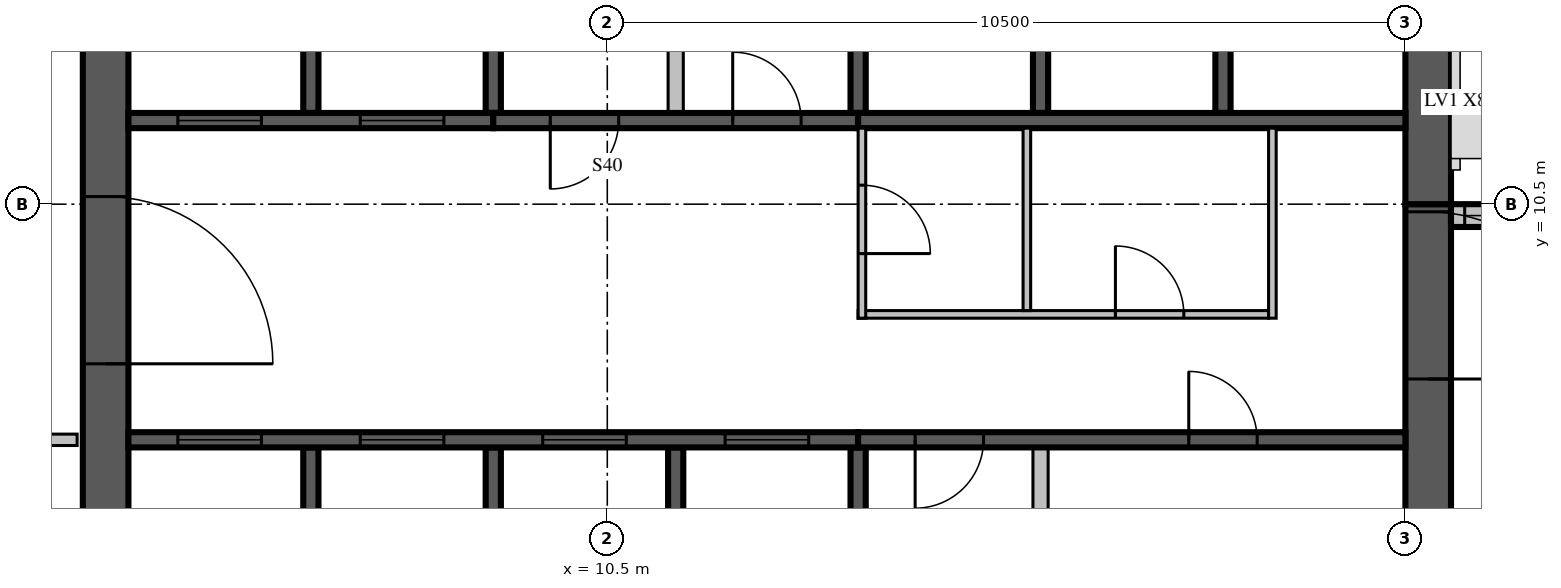
"""IFC4 building model, lengths in metres.
Left out: names, types, materials, properties, quantities, classifications, styles, units other than length and angle.
Written with IfcOpenShell. Run it as: python <this file> out.ifc"""

import sys

from ifc_helpers import new_model, si_unit, direction, frame, frame_2d, origin, place, context, subcontext, project, spatial, rectangle, extrude, source, transform, mapped, element, fill, save


model = new_model("IFC4")
c1 = context("Model", 3, precision=1e-05, world=origin(), true_north=direction((0.0, 1.0)))
c2 = subcontext(c1, "Body", "Model", "MODEL_VIEW")
j1 = project(units=[si_unit("LENGTHUNIT", "METRE"), si_unit("PLANEANGLEUNIT", "RADIAN")], contexts=[c1])
p1 = place(None, origin())
s1 = spatial("IfcSite", under=j1, at=p1, CompositionType="ELEMENT")
p2 = place(p1, origin())
s2 = spatial("IfcBuilding", under=s1, at=p2, CompositionType="ELEMENT")
p3 = place(p2, frame((0.0, 0.0, 312.5)))
s3 = spatial("IfcBuildingStorey", under=s2, at=p3, CompositionType="ELEMENT", Elevation=312.5)
m1 = source(origin(), c2, "Body", "SweptSolid", [
    extrude(rectangle(XDim=17.4, YDim=0.6, at=frame_2d((8.7, 0.0))), origin(), (0.0, 0.0, 1.0), 3.5),
])
p4 = place(p3, frame((3.9, 4.2, 0.0), z_axis=(0.0, 0.0, 1.0), x_axis=(0.0, 1.0, 0.0)))
e1 = element("IfcWall", 1, at=p4, inside=s3, PredefinedType="SHEAR", context=c2, shape_type="MappedRepresentation", body=[
    mapped(m1, transform((0.0, 0.0, 0.0), scale=1.0)),
])
m2 = source(origin(), c2, "Body", "SweptSolid", [
    extrude(rectangle(XDim=2.2, YDim=2.1, at=frame_2d((1.1, 1.05))), frame((0.0, 0.31, 0.0), z_axis=(0.0, -1.0, 0.0), x_axis=(1.0, 0.0, 0.0)), (0.0, 0.0, 1.0), 0.62),
])
p5 = place(p4, frame((4.2, 0.0, 0.0)))
e2 = element("IfcOpeningElement", 2, at=p5, cuts=e1, PredefinedType="OPENING", context=c2, shape_type="MappedRepresentation", body=[
    mapped(m2, transform((0.0, 0.0, 0.0), scale=1.0)),
])
m3 = source(origin(), c2, "Body", "SweptSolid", [
    extrude(rectangle(XDim=6.3, YDim=0.6, at=frame_2d((3.15, 0.0))), origin(), (0.0, 0.0, 1.0), 3.5),
])
p6 = place(p3, frame((21.3, 4.2, 0.0), z_axis=(0.0, 0.0, 1.0), x_axis=(0.0, 1.0, 0.0)))
e3 = element("IfcWall", 3, at=p6, inside=s3, PredefinedType="SHEAR", context=c2, shape_type="MappedRepresentation", body=[
    mapped(m3, transform((0.0, 0.0, 0.0), scale=1.0)),
])
p7 = place(p6, frame((4.0, 0.0, 0.0)))
e4 = element("IfcOpeningElement", 4, at=p7, cuts=e3, PredefinedType="OPENING", context=c2, shape_type="MappedRepresentation", body=[
    mapped(m2, transform((0.0, 0.0, 0.0), scale=1.0)),
])
m4 = source(origin(), c2, "Body", "SweptSolid", [
    extrude(rectangle(XDim=10.5, YDim=0.6, at=frame_2d((5.25, 0.0))), origin(), (0.0, 0.0, 1.0), 3.5),
])
p8 = place(p3, frame((21.3, 10.5, 0.0), z_axis=(0.0, 0.0, 1.0), x_axis=(0.0, 1.0, 0.0)))
e5 = element("IfcWall", 5, at=p8, inside=s3, PredefinedType="SHEAR", context=c2, shape_type="MappedRepresentation", body=[
    mapped(m4, transform((0.0, 0.0, 0.0), scale=1.0)),
])
m5 = source(origin(), c2, "Body", "SweptSolid", [
    extrude(rectangle(XDim=1.2, YDim=2.4, at=frame_2d((0.6, 1.2))), frame((0.0, 0.31, 0.0), z_axis=(0.0, -1.0, 0.0), x_axis=(1.0, 0.0, 0.0)), (0.0, 0.0, 1.0), 0.62),
])
p9 = place(p8, frame((5.7, 0.0, 0.6)))
e6 = element("IfcOpeningElement", 6, at=p9, cuts=e5, PredefinedType="OPENING", context=c2, shape_type="MappedRepresentation", body=[
    mapped(m5, transform((0.0, 0.0, 0.0), scale=1.0)),
])
m6 = source(origin(), c2, "Body", "SweptSolid", [
    extrude(rectangle(XDim=7.45, YDim=0.3, at=frame_2d((3.725, 0.0))), origin(), (0.0, 0.0, 1.0), 3.1),
])
p10 = place(p3, frame((29.05, 10.35, 0.0), z_axis=(0.0, 0.0, 1.0), x_axis=(-1.0, 0.0, 0.0)))
e7 = element("IfcWall", 7, at=p10, inside=s3, PredefinedType="STANDARD", context=c2, shape_type="MappedRepresentation", body=[
    mapped(m6, transform((0.0, 0.0, 0.0), scale=1.0)),
])
m7 = source(origin(), c2, "Body", "SweptSolid", [
    extrude(rectangle(XDim=3.0, YDim=2.0, at=frame_2d((1.5, 1.0))), frame((0.0, 0.16, 0.0), z_axis=(0.0, -1.0, 0.0), x_axis=(1.0, 0.0, 0.0)), (0.0, 0.0, 1.0), 0.32),
])
p11 = place(p10, frame((1.09, 0.0, 0.6)))
e8 = element("IfcOpeningElement", 8, at=p11, cuts=e7, PredefinedType="OPENING", context=c2, shape_type="MappedRepresentation", body=[
    mapped(m7, transform((0.0, 0.0, 0.0), scale=1.0)),
])
m8 = source(origin(), c2, "Body", "SweptSolid", [
    extrude(rectangle(XDim=1.8, YDim=2.0, at=frame_2d((0.9, 1.0))), frame((0.0, 0.16, 0.0), z_axis=(0.0, -1.0, 0.0), x_axis=(1.0, 0.0, 0.0)), (0.0, 0.0, 1.0), 0.32),
])
p12 = place(p10, frame((5.47, 0.0, 0.6)))
e9 = element("IfcOpeningElement", 9, at=p12, cuts=e7, PredefinedType="OPENING", context=c2, shape_type="MappedRepresentation", body=[
    mapped(m8, transform((0.0, 0.0, 0.0), scale=1.0)),
])
m9 = source(origin(), c2, "Body", "SweptSolid", [
    extrude(rectangle(XDim=3.1, YDim=0.2, at=frame_2d((1.55, 0.0))), origin(), (0.0, 0.0, 1.0), 3.5),
])
for number, where, z_axis, x_axis in (
    (10, (6.6, 4.2, 0.0), (0.0, 0.0, 1.0), (0.0, 1.0, 0.0)),
    (11, (9.0, 4.2, 0.0), (0.0, 0.0, 1.0), (0.0, 1.0, 0.0)),
    (12, (11.4, 4.2, 0.0), (0.0, 0.0, 1.0), (0.0, 1.0, 0.0)),
):
    element("IfcWall", number, at=place(p3, frame(where, z_axis=z_axis, x_axis=x_axis)), inside=s3, PredefinedType="SOLIDWALL", context=c2, shape_type="MappedRepresentation", body=[
        mapped(m9, transform((0.0, 0.0, 0.0), scale=1.0)),
    ])
m10 = source(origin(), c2, "Body", "SweptSolid", [
    extrude(rectangle(XDim=3.1, YDim=0.2, at=frame_2d((1.55, 0.0))), origin(), (0.0, 0.0, 1.0), 3.1),
])
p13 = place(p3, frame((13.8, 4.2, 0.0), z_axis=(0.0, 0.0, 1.0), x_axis=(0.0, 1.0, 0.0)))
e13 = element("IfcWall", 13, at=p13, inside=s3, PredefinedType="SOLIDWALL", context=c2, shape_type="MappedRepresentation", body=[
    mapped(m10, transform((0.0, 0.0, 0.0), scale=1.0)),
])
m11 = source(origin(), c2, "Body", "SweptSolid", [
    extrude(rectangle(XDim=3.1, YDim=0.2, at=frame_2d((1.55, 0.0))), origin(), (0.0, 0.0, 1.0), 3.1),
])
p14 = place(p3, frame((16.2, 4.2, 0.0), z_axis=(0.0, 0.0, 1.0), x_axis=(0.0, 1.0, 0.0)))
e14 = element("IfcWall", 14, at=p14, inside=s3, PredefinedType="PARTITIONING", context=c2, shape_type="MappedRepresentation", body=[
    mapped(m11, transform((0.0, 0.0, 0.0), scale=1.0)),
])
m12 = source(origin(), c2, "Body", "SweptSolid", [
    extrude(rectangle(XDim=3.0, YDim=0.2, at=frame_2d((1.5, 0.0))), origin(), (0.0, 0.0, 1.0), 3.5),
])
p15 = place(p3, frame((6.6, 11.7, 0.0), z_axis=(0.0, 0.0, 1.0), x_axis=(0.0, 1.0, 0.0)))
e15 = element("IfcWall", 15, at=p15, inside=s3, PredefinedType="SOLIDWALL", context=c2, shape_type="MappedRepresentation", body=[
    mapped(m12, transform((0.0, 0.0, 0.0), scale=1.0)),
])
m13 = source(origin(), c2, "Body", "SweptSolid", [
    extrude(rectangle(XDim=3.0, YDim=0.2, at=frame_2d((1.5, 0.0))), origin(), (0.0, 0.0, 1.0), 3.1),
])
for number, where, z_axis, x_axis in (
    (16, (9.0, 11.7, 0.0), (0.0, 0.0, 1.0), (0.0, 1.0, 0.0)),
    (17, (13.8, 11.7, 0.0), (0.0, 0.0, 1.0), (0.0, 1.0, 0.0)),
):
    element("IfcWall", number, at=place(p3, frame(where, z_axis=z_axis, x_axis=x_axis)), inside=s3, PredefinedType="SOLIDWALL", context=c2, shape_type="MappedRepresentation", body=[
        mapped(m13, transform((0.0, 0.0, 0.0), scale=1.0)),
    ])
for number, where, z_axis, x_axis in (
    (18, (16.2, 11.7, 0.0), (0.0, 0.0, 1.0), (0.0, 1.0, 0.0)),
    (19, (18.6, 11.7, 0.0), (0.0, 0.0, 1.0), (0.0, 1.0, 0.0)),
):
    element("IfcWall", number, at=place(p3, frame(where, z_axis=z_axis, x_axis=x_axis)), inside=s3, PredefinedType="SOLIDWALL", context=c2, shape_type="MappedRepresentation", body=[
        mapped(m12, transform((0.0, 0.0, 0.0), scale=1.0)),
    ])
m14 = source(origin(), c2, "Body", "SweptSolid", [
    extrude(rectangle(XDim=3.0, YDim=0.2, at=frame_2d((1.5, 0.0))), origin(), (0.0, 0.0, 1.0), 3.1),
])
p16 = place(p3, frame((11.4, 11.7, 0.0), z_axis=(0.0, 0.0, 1.0), x_axis=(0.0, 1.0, 0.0)))
e20 = element("IfcWall", 20, at=p16, inside=s3, PredefinedType="PARTITIONING", context=c2, shape_type="MappedRepresentation", body=[
    mapped(m14, transform((0.0, 0.0, 0.0), scale=1.0)),
])
m15 = source(origin(), c2, "Body", "SweptSolid", [
    extrude(rectangle(XDim=9.6, YDim=0.2, at=frame_2d((4.8, 0.0))), origin(), (0.0, 0.0, 1.0), 3.5),
])
p17 = place(p3, frame((4.2, 7.4, 0.0), z_axis=(0.0, 0.0, 1.0), x_axis=(1.0, 0.0, 0.0)))
e21 = element("IfcWall", 21, at=p17, inside=s3, PredefinedType="SOLIDWALL", context=c2, shape_type="MappedRepresentation", body=[
    mapped(m15, transform((0.0, 0.0, 0.0), scale=1.0)),
])
m16 = source(origin(), c2, "Body", "SweptSolid", [
    extrude(rectangle(XDim=1.1, YDim=2.1, at=frame_2d((0.55, 1.05))), frame((0.0, 0.11, 0.0), z_axis=(0.0, -1.0, 0.0), x_axis=(1.0, 0.0, 0.0)), (0.0, 0.0, 1.0), 0.22),
])
p18 = place(p17, frame((0.65, 0.0, 0.0)))
e22 = element("IfcOpeningElement", 22, at=p18, cuts=e21, PredefinedType="OPENING", context=c2, shape_type="MappedRepresentation", body=[
    mapped(m16, transform((0.0, 0.0, 0.0), scale=1.0)),
])
p19 = place(p17, frame((3.05, 0.0, 0.0)))
e23 = element("IfcOpeningElement", 23, at=p19, cuts=e21, PredefinedType="OPENING", context=c2, shape_type="MappedRepresentation", body=[
    mapped(m16, transform((0.0, 0.0, 0.0), scale=1.0)),
])
p20 = place(p17, frame((5.45, 0.0, 0.0)))
e24 = element("IfcOpeningElement", 24, at=p20, cuts=e21, PredefinedType="OPENING", context=c2, shape_type="MappedRepresentation", body=[
    mapped(m16, transform((0.0, 0.0, 0.0), scale=1.0)),
])
p21 = place(p17, frame((7.85, 0.0, 0.0)))
e25 = element("IfcOpeningElement", 25, at=p21, cuts=e21, PredefinedType="OPENING", context=c2, shape_type="MappedRepresentation", body=[
    mapped(m16, transform((0.0, 0.0, 0.0), scale=1.0)),
])
m17 = source(origin(), c2, "Body", "SweptSolid", [
    extrude(rectangle(XDim=7.2, YDim=0.2, at=frame_2d((3.6, 0.0))), origin(), (0.0, 0.0, 1.0), 3.1),
])
p22 = place(p3, frame((13.8, 7.4, 0.0), z_axis=(0.0, 0.0, 1.0), x_axis=(1.0, 0.0, 0.0)))
e26 = element("IfcWall", 26, at=p22, inside=s3, PredefinedType="SOLIDWALL", context=c2, shape_type="MappedRepresentation", body=[
    mapped(m17, transform((0.0, 0.0, 0.0), scale=1.0)),
])
m18 = source(origin(), c2, "Body", "SweptSolid", [
    extrude(rectangle(XDim=0.9, YDim=2.1, at=frame_2d((0.45, 1.05))), frame((0.0, 0.11, 0.0), z_axis=(0.0, -1.0, 0.0), x_axis=(1.0, 0.0, 0.0)), (0.0, 0.0, 1.0), 0.22),
])
p23 = place(p22, frame((0.75, 0.0, 0.0)))
e27 = element("IfcOpeningElement", 27, at=p23, cuts=e26, PredefinedType="OPENING", context=c2, shape_type="MappedRepresentation", body=[
    mapped(m18, transform((0.0, 0.0, 0.0), scale=1.0)),
])
p24 = place(p22, frame((4.35, 0.0, 0.0)))
e28 = element("IfcOpeningElement", 28, at=p24, cuts=e26, PredefinedType="OPENING", context=c2, shape_type="MappedRepresentation", body=[
    mapped(m18, transform((0.0, 0.0, 0.0), scale=1.0)),
])
m19 = source(origin(), c2, "Body", "SweptSolid", [
    extrude(rectangle(XDim=4.8, YDim=0.2, at=frame_2d((2.4, 0.0))), origin(), (0.0, 0.0, 1.0), 3.5),
])
p25 = place(p3, frame((4.2, 11.6, 0.0), z_axis=(0.0, 0.0, 1.0), x_axis=(1.0, 0.0, 0.0)))
e29 = element("IfcWall", 29, at=p25, inside=s3, PredefinedType="SOLIDWALL", context=c2, shape_type="MappedRepresentation", body=[
    mapped(m19, transform((0.0, 0.0, 0.0), scale=1.0)),
])
p26 = place(p25, frame((0.65, 0.0, 0.0)))
e30 = element("IfcOpeningElement", 30, at=p26, cuts=e29, PredefinedType="OPENING", context=c2, shape_type="MappedRepresentation", body=[
    mapped(m16, transform((0.0, 0.0, 0.0), scale=1.0)),
])
p27 = place(p25, frame((3.05, 0.0, 0.0)))
e31 = element("IfcOpeningElement", 31, at=p27, cuts=e29, PredefinedType="OPENING", context=c2, shape_type="MappedRepresentation", body=[
    mapped(m16, transform((0.0, 0.0, 0.0), scale=1.0)),
])
m20 = source(origin(), c2, "Body", "SweptSolid", [
    extrude(rectangle(XDim=4.8, YDim=0.2, at=frame_2d((2.4, 0.0))), origin(), (0.0, 0.0, 1.0), 3.1),
])
p28 = place(p3, frame((9.0, 11.6, 0.0), z_axis=(0.0, 0.0, 1.0), x_axis=(1.0, 0.0, 0.0)))
e32 = element("IfcWall", 32, at=p28, inside=s3, PredefinedType="SOLIDWALL", context=c2, shape_type="MappedRepresentation", body=[
    mapped(m20, transform((0.0, 0.0, 0.0), scale=1.0)),
])
p29 = place(p28, frame((0.75, 0.0, 0.0)))
e33 = element("IfcOpeningElement", 33, at=p29, cuts=e32, PredefinedType="OPENING", context=c2, shape_type="MappedRepresentation", body=[
    mapped(m18, transform((0.0, 0.0, 0.0), scale=1.0)),
])
p30 = place(p28, frame((3.15, 0.0, 0.0)))
e34 = element("IfcOpeningElement", 34, at=p30, cuts=e32, PredefinedType="OPENING", context=c2, shape_type="MappedRepresentation", body=[
    mapped(m18, transform((0.0, 0.0, 0.0), scale=1.0)),
])
m21 = source(origin(), c2, "Body", "SweptSolid", [
    extrude(rectangle(XDim=7.2, YDim=0.2, at=frame_2d((3.6, 0.0))), origin(), (0.0, 0.0, 1.0), 3.5),
])
p31 = place(p3, frame((13.8, 11.6, 0.0), z_axis=(0.0, 0.0, 1.0), x_axis=(1.0, 0.0, 0.0)))
e35 = element("IfcWall", 35, at=p31, inside=s3, PredefinedType="SOLIDWALL", context=c2, shape_type="MappedRepresentation", body=[
    mapped(m21, transform((0.0, 0.0, 0.0), scale=1.0)),
])
m22 = source(origin(), c2, "Body", "SweptSolid", [
    extrude(rectangle(XDim=5.4, YDim=0.1, at=frame_2d((2.7, 0.0))), origin(), (0.0, 0.0, 1.0), 3.1),
])
p32 = place(p3, frame((13.8, 9.05, 0.0), z_axis=(0.0, 0.0, 1.0), x_axis=(1.0, 0.0, 0.0)))
e36 = element("IfcWall", 36, at=p32, inside=s3, PredefinedType="PARTITIONING", context=c2, shape_type="MappedRepresentation", body=[
    mapped(m22, transform((0.0, 0.0, 0.0), scale=1.0)),
])
m23 = source(origin(), c2, "Body", "SweptSolid", [
    extrude(rectangle(XDim=0.9, YDim=2.1, at=frame_2d((0.45, 1.05))), frame((0.0, 0.06, 0.0), z_axis=(0.0, -1.0, 0.0), x_axis=(1.0, 0.0, 0.0)), (0.0, 0.0, 1.0), 0.12),
])
p33 = place(p32, frame((3.385, 0.0, 0.0)))
e37 = element("IfcOpeningElement", 37, at=p33, cuts=e36, PredefinedType="OPENING", context=c2, shape_type="MappedRepresentation", body=[
    mapped(m23, transform((0.0, 0.0, 0.0), scale=1.0)),
])
m24 = source(origin(), c2, "Body", "SweptSolid", [
    extrude(rectangle(XDim=2.5, YDim=0.1, at=frame_2d((1.25, 0.0))), origin(), (0.0, 0.0, 1.0), 3.1),
])
p34 = place(p3, frame((13.85, 9.0, 0.0), z_axis=(0.0, 0.0, 1.0), x_axis=(0.0, 1.0, 0.0)))
e38 = element("IfcWall", 38, at=p34, inside=s3, PredefinedType="PARTITIONING", context=c2, shape_type="MappedRepresentation", body=[
    mapped(m24, transform((0.0, 0.0, 0.0), scale=1.0)),
])
p35 = place(p34, frame((0.85, 0.0, 0.0)))
e39 = element("IfcOpeningElement", 39, at=p35, cuts=e38, PredefinedType="OPENING", context=c2, shape_type="MappedRepresentation", body=[
    mapped(m23, transform((0.0, 0.0, 0.0), scale=1.0)),
])
m25 = source(origin(), c2, "Body", "SweptSolid", [
    extrude(rectangle(XDim=2.4, YDim=0.1, at=frame_2d((1.2, 0.0))), origin(), (0.0, 0.0, 1.0), 3.1),
])
p36 = place(p3, frame((16.02, 9.1, 0.0), z_axis=(0.0, 0.0, 1.0), x_axis=(0.0, 1.0, 0.0)))
e40 = element("IfcWall", 40, at=p36, inside=s3, PredefinedType="PARTITIONING", context=c2, shape_type="MappedRepresentation", body=[
    mapped(m25, transform((0.0, 0.0, 0.0), scale=1.0)),
])
p37 = place(p3, frame((19.25, 9.0, 0.0), z_axis=(0.0, 0.0, 1.0), x_axis=(0.0, 1.0, 0.0)))
e41 = element("IfcWall", 41, at=p37, inside=s3, PredefinedType="PARTITIONING", context=c2, shape_type="MappedRepresentation", body=[
    mapped(m24, transform((0.0, 0.0, 0.0), scale=1.0)),
])
m26 = source(origin(), c2, "Body", "SweptSolid", [
    extrude(rectangle(XDim=3.225, YDim=0.15, at=frame_2d((1.613, 0.0))), origin(), (0.0, 0.0, 1.0), 3.1),
])
p38 = place(p3, frame((0.3, 7.4, 0.0), z_axis=(0.0, 0.0, 1.0), x_axis=(1.0, 0.0, 0.0)))
e42 = element("IfcWall", 42, at=p38, inside=s3, PredefinedType="PARTITIONING", context=c2, shape_type="MappedRepresentation", body=[
    mapped(m26, transform((0.0, 0.0, 0.0), scale=1.0)),
])
m27 = source(origin(), c2, "Body", "SweptSolid", [
    extrude(rectangle(XDim=0.9, YDim=2.1, at=frame_2d((0.45, 1.05))), frame((0.0, 0.085, 0.0), z_axis=(0.0, -1.0, 0.0), x_axis=(1.0, 0.0, 0.0)), (0.0, 0.0, 1.0), 0.17),
])
p39 = place(p38, frame((1.2, 0.0, 0.0)))
e43 = element("IfcOpeningElement", 43, at=p39, cuts=e42, PredefinedType="OPENING", context=c2, shape_type="MappedRepresentation", body=[
    mapped(m27, transform((0.0, 0.0, 0.0), scale=1.0)),
])
m28 = source(origin(), c2, "Body", "SweptSolid", [
    extrude(rectangle(XDim=1.8, YDim=2.0, at=frame_2d((0.9, 1.0))), frame((0.0, 0.03, 0.0), z_axis=(0.0, -1.0, 0.0), x_axis=(1.0, 0.0, 0.0)), (0.0, 0.0, 1.0), 0.06),
])
p40 = place(p12, origin())
e44 = element("IfcWindow", 44, at=p40, inside=s3, PartitioningType="SINGLE_PANEL", PredefinedType="WINDOW", context=c2, shape_type="MappedRepresentation", body=[
    mapped(m28, transform((0.0, 0.0, 0.0), scale=1.0)),
])
fill(e9, e44)
m29 = source(origin(), c2, "Body", "SweptSolid", [
    extrude(rectangle(XDim=1.1, YDim=2.1, at=frame_2d((0.55, 1.05))), frame((0.0, 0.025, 0.0), z_axis=(0.0, -1.0, 0.0), x_axis=(1.0, 0.0, 0.0)), (0.0, 0.0, 1.0), 0.05),
])
p41 = place(p18, origin())
e45 = element("IfcDoor", 45, at=p41, inside=s3, OperationType="SLIDING_TO_LEFT", PredefinedType="DOOR", context=c2, shape_type="MappedRepresentation", body=[
    mapped(m29, transform((0.0, 0.0, 0.0), scale=1.0)),
])
fill(e22, e45)
p42 = place(p19, origin())
e46 = element("IfcDoor", 46, at=p42, inside=s3, OperationType="SLIDING_TO_LEFT", PredefinedType="DOOR", context=c2, shape_type="MappedRepresentation", body=[
    mapped(m29, transform((0.0, 0.0, 0.0), scale=1.0)),
])
fill(e23, e46)
p43 = place(p20, origin())
e47 = element("IfcDoor", 47, at=p43, inside=s3, OperationType="SLIDING_TO_LEFT", PredefinedType="DOOR", context=c2, shape_type="MappedRepresentation", body=[
    mapped(m29, transform((0.0, 0.0, 0.0), scale=1.0)),
])
fill(e24, e47)
p44 = place(p21, origin())
e48 = element("IfcDoor", 48, at=p44, inside=s3, OperationType="SLIDING_TO_LEFT", PredefinedType="DOOR", context=c2, shape_type="MappedRepresentation", body=[
    mapped(m29, transform((0.0, 0.0, 0.0), scale=1.0)),
])
fill(e25, e48)
m30 = source(origin(), c2, "Body", "SweptSolid", [
    extrude(rectangle(XDim=0.9, YDim=2.1, at=frame_2d((0.45, 1.05))), frame((0.0, 0.025, 0.0), z_axis=(0.0, -1.0, 0.0), x_axis=(1.0, 0.0, 0.0)), (0.0, 0.0, 1.0), 0.05),
])
p45 = place(p23, origin())
e49 = element("IfcDoor", 49, at=p45, inside=s3, OperationType="SINGLE_SWING_RIGHT", PredefinedType="DOOR", context=c2, shape_type="MappedRepresentation", body=[
    mapped(m30, transform((0.0, 0.0, 0.0), scale=1.0)),
])
fill(e27, e49)
p46 = place(p24, origin())
e50 = element("IfcDoor", 50, at=p46, inside=s3, OperationType="SINGLE_SWING_LEFT", PredefinedType="DOOR", context=c2, shape_type="MappedRepresentation", body=[
    mapped(m30, transform((0.0, 0.0, 0.0), scale=1.0)),
])
fill(e28, e50)
p47 = place(p26, origin())
e51 = element("IfcDoor", 51, at=p47, inside=s3, OperationType="SLIDING_TO_LEFT", PredefinedType="DOOR", context=c2, shape_type="MappedRepresentation", body=[
    mapped(m29, transform((0.0, 0.0, 0.0), scale=1.0)),
])
fill(e30, e51)
p48 = place(p27, origin())
e52 = element("IfcDoor", 52, at=p48, inside=s3, OperationType="SLIDING_TO_LEFT", PredefinedType="DOOR", context=c2, shape_type="MappedRepresentation", body=[
    mapped(m29, transform((0.0, 0.0, 0.0), scale=1.0)),
])
fill(e31, e52)
p49 = place(p29, origin())
e53 = element("IfcDoor", 53, at=p49, inside=s3, OperationType="SINGLE_SWING_RIGHT", PredefinedType="DOOR", context=c2, shape_type="MappedRepresentation", body=[
    mapped(m30, transform((0.0, 0.0, 0.0), scale=1.0)),
])
fill(e33, e53)
p50 = place(p30, origin())
e54 = element("IfcDoor", 54, at=p50, inside=s3, OperationType="SINGLE_SWING_LEFT", PredefinedType="DOOR", context=c2, shape_type="MappedRepresentation", body=[
    mapped(m30, transform((0.0, 0.0, 0.0), scale=1.0)),
])
fill(e34, e54)
p51 = place(p33, origin())
e55 = element("IfcDoor", 55, at=p51, inside=s3, OperationType="SINGLE_SWING_LEFT", PredefinedType="DOOR", context=c2, shape_type="MappedRepresentation", body=[
    mapped(m30, transform((0.0, 0.0, 0.0), scale=1.0)),
])
fill(e37, e55)
p52 = place(p35, origin())
e56 = element("IfcDoor", 56, at=p52, inside=s3, OperationType="SINGLE_SWING_RIGHT", PredefinedType="DOOR", context=c2, shape_type="MappedRepresentation", body=[
    mapped(m30, transform((0.0, 0.0, 0.0), scale=1.0)),
])
fill(e39, e56)
m31 = source(origin(), c2, "Body", "SweptSolid", [
    extrude(rectangle(XDim=2.2, YDim=2.1, at=frame_2d((1.1, 1.05))), frame((0.0, 0.025, 0.0), z_axis=(0.0, -1.0, 0.0), x_axis=(1.0, 0.0, 0.0)), (0.0, 0.0, 1.0), 0.05),
])
p53 = place(p7, origin())
e57 = element("IfcDoor", 57, at=p53, inside=s3, OperationType="DOUBLE_DOOR_SINGLE_SWING", PredefinedType="DOOR", context=c2, shape_type="MappedRepresentation", body=[
    mapped(m31, transform((0.0, 0.0, 0.0), scale=1.0)),
])
fill(e4, e57)
p54 = place(p5, origin())
e58 = element("IfcDoor", 58, at=p54, inside=s3, OperationType="DOUBLE_DOOR_SINGLE_SWING", PredefinedType="DOOR", context=c2, shape_type="MappedRepresentation", body=[
    mapped(m31, transform((0.0, 0.0, 0.0), scale=1.0)),
])
fill(e2, e58)
save(model, sys.argv[1])
